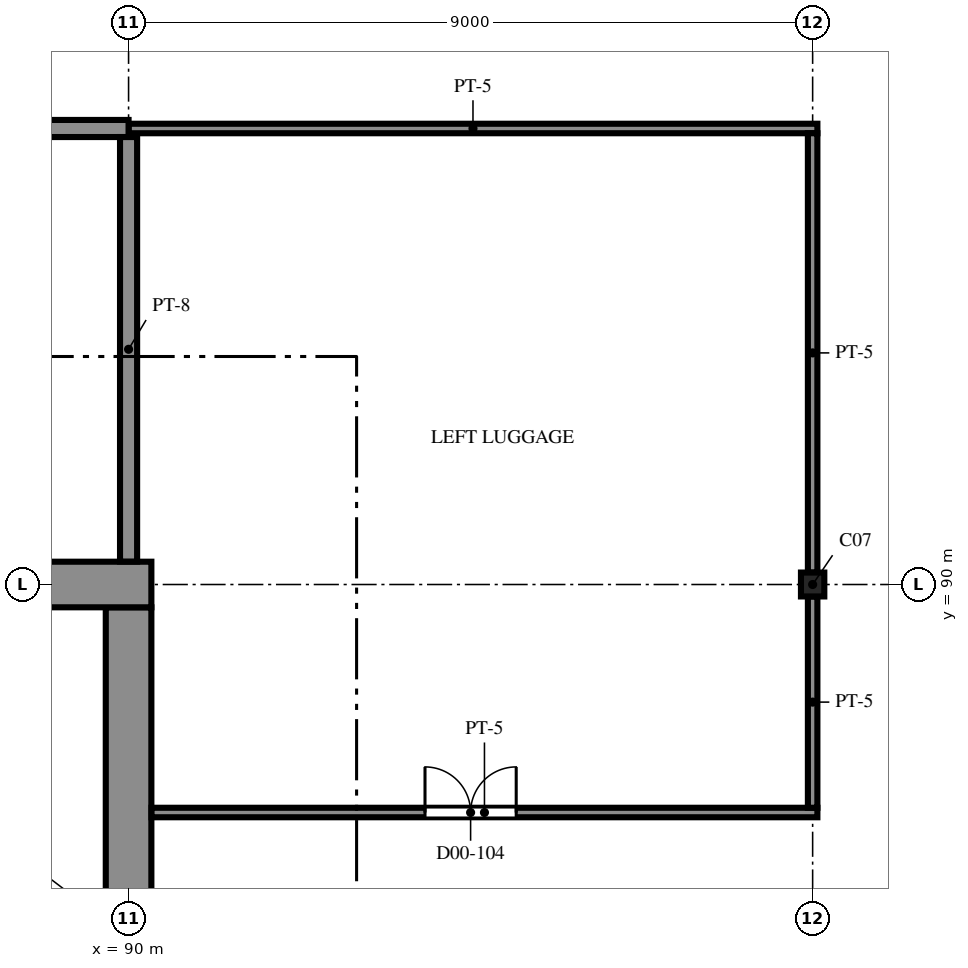
"""IFC4 building model, lengths in metres.
Left out: names, types, materials, properties, quantities, classifications, styles, units other than length and angle.
Written with IfcOpenShell. Run it as: python <this file> out.ifc"""

import sys

from ifc_helpers import new_model, si_unit, direction, frame, frame_2d, origin, origin_2d, place, context, subcontext, project, spatial, polyline, rectangle, i_section, outline, extrude, element, fill, save


model = new_model("IFC4")
c1 = context("Model", 3, precision=1e-05, world=origin(), true_north=direction((0.0, 1.0)))
c2 = subcontext(c1, "Body", "Model", "MODEL_VIEW")
j1 = project(units=[si_unit("LENGTHUNIT", "METRE"), si_unit("PLANEANGLEUNIT", "RADIAN")], contexts=[c1])
p1 = place(None, origin())
s1 = spatial("IfcSite", under=j1, at=p1, CompositionType="ELEMENT")
p2 = place(p1, origin())
s2 = spatial("IfcBuilding", under=s1, at=p2, CompositionType="ELEMENT")
p3 = place(p2, origin())
s3 = spatial("IfcBuildingStorey", under=s2, at=p3, CompositionType="ELEMENT", Elevation=0.0)
p4 = place(p3, frame((99.0, 90.0, -2.1), z_axis=(0.0, 0.0, 1.0), x_axis=(1.0, 0.0, 0.0)))
e1 = element("IfcColumn", 1, at=p4, inside=s3, PredefinedType="COLUMN", context=c2, shape_type="SweptSolid", body=[
    extrude(i_section(OverallWidth=0.307, OverallDepth=0.314, WebThickness=0.012, FlangeThickness=0.019, FilletRadius=0.015, at=origin_2d()), origin(), (0.0, 0.0, 1.0), 9.6),
])
p5 = place(p3, frame((71.7, 90.0, -2.1), z_axis=(0.0, 0.0, 1.0), x_axis=(1.0, 0.0, 0.0)))
e2 = element("IfcWall", 2, at=p5, inside=s3, PredefinedType="SOLIDWALL", context=c2, shape_type="SweptSolid", body=[
    extrude(rectangle(XDim=18.6, YDim=0.6, at=frame_2d((9.3, 0.0))), origin(), (0.0, 0.0, 1.0), 9.6),
])
p6 = place(p3, frame((90.0, 81.3, -2.1), z_axis=(0.0, 0.0, 1.0), x_axis=(0.0, 1.0, 0.0)))
e3 = element("IfcWall", 3, at=p6, inside=s3, PredefinedType="SOLIDWALL", context=c2, shape_type="SweptSolid", body=[
    extrude(rectangle(XDim=8.4, YDim=0.6, at=frame_2d((4.2, 0.0))), origin(), (0.0, 0.0, 1.0), 9.6),
])
p7 = place(p6, frame((2.8, 0.0, 2.1)))
e4 = element("IfcOpeningElement", 4, at=p7, cuts=e3, PredefinedType="OPENING", context=c2, shape_type="SweptSolid", body=[
    extrude(rectangle(XDim=1.8, YDim=2.1, at=frame_2d((0.9, 1.05))), frame((0.0, 0.31, 0.0), z_axis=(0.0, -1.0, 0.0), x_axis=(1.0, 0.0, 0.0)), (0.0, 0.0, 1.0), 0.62),
])
p8 = place(p6, frame((0.55, 0.0, 2.1)))
e5 = element("IfcOpeningElement", 5, at=p8, cuts=e3, PredefinedType="OPENING", context=c2, shape_type="SweptSolid", body=[
    extrude(rectangle(XDim=0.9, YDim=2.1, at=frame_2d((0.45, 1.05))), frame((0.0, 0.31, 0.0), z_axis=(0.0, -1.0, 0.0), x_axis=(1.0, 0.0, 0.0)), (0.0, 0.0, 1.0), 0.62),
])
p9 = place(p3, frame((99.062, 96.0, 0.0), z_axis=(0.0, 0.0, 1.0), x_axis=(-1.0, 0.0, 0.0)))
e6 = element("IfcWall", 6, at=p9, inside=s3, PredefinedType="PARTITIONING", context=c2, shape_type="SweptSolid", body=[
    extrude(rectangle(XDim=9.062, YDim=0.125, at=frame_2d((4.531, 0.0))), origin(), (0.0, 0.0, 1.0), 6.757),
])
p10 = place(p3, frame((90.0, 96.0, 0.0), z_axis=(0.0, 0.0, 1.0), x_axis=(-1.0, 0.0, 0.0)))
e7 = element("IfcWall", 7, at=p10, inside=s3, PredefinedType="PARTITIONING", context=c2, shape_type="SweptSolid", body=[
    extrude(rectangle(XDim=9.0, YDim=0.225, at=frame_2d((4.5, 0.0))), origin(), (0.0, 0.0, 1.0), 6.6),
])
p11 = place(p10, frame((3.9, 0.0, 0.0)))
e8 = element("IfcOpeningElement", 8, at=p11, cuts=e7, PredefinedType="OPENING", context=c2, shape_type="SweptSolid", body=[
    extrude(rectangle(XDim=1.2, YDim=2.4, at=frame_2d((0.6, 1.2))), frame((0.0, 0.123, 0.0), z_axis=(0.0, -1.0, 0.0), x_axis=(1.0, 0.0, 0.0)), (0.0, 0.0, 1.0), 0.245),
])
p12 = place(p3, frame((90.302, 87.0, 0.0), z_axis=(0.0, 0.0, 1.0), x_axis=(1.0, 0.0, 0.0)))
e9 = element("IfcWall", 9, at=p12, inside=s3, PredefinedType="PARTITIONING", context=c2, shape_type="SweptSolid", body=[
    extrude(rectangle(XDim=8.76, YDim=0.125, at=frame_2d((4.38, 0.0))), origin(), (0.0, 0.0, 1.0), 6.757),
])
p13 = place(p12, frame((3.598, 0.0, 0.0)))
e10 = element("IfcOpeningElement", 10, at=p13, cuts=e9, PredefinedType="OPENING", context=c2, shape_type="SweptSolid", body=[
    extrude(rectangle(XDim=1.2, YDim=2.1, at=frame_2d((0.6, 1.05))), frame((0.0, 0.073, 0.0), z_axis=(0.0, -1.0, 0.0), x_axis=(1.0, 0.0, 0.0)), (0.0, 0.0, 1.0), 0.145),
])
p14 = place(p3, frame((99.0, 87.062, 0.0), z_axis=(0.0, 0.0, 1.0), x_axis=(0.0, 1.0, 0.0)))
e11 = element("IfcWall", 11, at=p14, inside=s3, PredefinedType="PARTITIONING", context=c2, shape_type="SweptSolid", body=[
    extrude(rectangle(XDim=2.78, YDim=0.125, at=frame_2d((1.39, 0.0))), origin(), (0.0, 0.0, 1.0), 6.757),
])
p15 = place(p3, frame((99.0, 90.157, 0.0), z_axis=(0.0, 0.0, 1.0), x_axis=(0.0, 1.0, 0.0)))
e12 = element("IfcWall", 12, at=p15, inside=s3, PredefinedType="PARTITIONING", context=c2, shape_type="SweptSolid", body=[
    extrude(rectangle(XDim=5.78, YDim=0.125, at=frame_2d((2.89, 0.0))), origin(), (0.0, 0.0, 1.0), 6.757),
])
p16 = place(p3, frame((90.0, 95.887, 0.0), z_axis=(0.0, 0.0, 1.0), x_axis=(0.0, -1.0, 0.0)))
e13 = element("IfcWall", 13, at=p16, inside=s3, PredefinedType="PARTITIONING", context=c2, shape_type="SweptSolid", body=[
    extrude(rectangle(XDim=5.585, YDim=0.225, at=frame_2d((2.793, 0.0))), origin(), (0.0, 0.0, 1.0), 6.6),
])
p17 = place(p13, origin())
e14 = element("IfcDoor", 14, at=p17, inside=s3, OperationType="DOUBLE_DOOR_SINGLE_SWING", PredefinedType="DOOR", context=c2, shape_type="SweptSolid", body=[
    extrude(outline(polyline([(0.0, 0.0), (0.07, 0.0), (0.07, 2.03), (1.13, 2.03), (1.13, 0.0), (1.2, 0.0), (1.2, 2.1), (0.0, 2.1), (0.0, 0.0)])), frame((0.0, 0.025, 0.0), z_axis=(0.0, -1.0, 0.0), x_axis=(1.0, 0.0, 0.0)), (0.0, 0.0, 1.0), 0.05),
    extrude(outline(polyline([(0.074, 0.01), (0.597, 0.01), (0.597, 2.026), (0.074, 2.026), (0.074, 0.01)]), holes=[polyline([(0.178, 0.373), (0.492, 0.373), (0.492, 1.784), (0.178, 1.784), (0.178, 0.373)])]), frame((0.0, 0.017, 0.0), z_axis=(0.0, -1.0, 0.0), x_axis=(1.0, 0.0, 0.0)), (0.0, 0.0, 1.0), 0.035),
    extrude(rectangle(XDim=0.314, YDim=1.411, at=frame_2d((0.335, 1.079))), frame((0.0, 0.009, 0.0), z_axis=(0.0, -1.0, 0.0), x_axis=(1.0, 0.0, 0.0)), (0.0, 0.0, 1.0), 0.017),
    extrude(outline(polyline([(0.603, 0.01), (1.126, 0.01), (1.126, 2.026), (0.603, 2.026), (0.603, 0.01)]), holes=[polyline([(0.708, 0.373), (1.021, 0.373), (1.021, 1.784), (0.708, 1.784), (0.708, 0.373)])]), frame((0.0, 0.017, 0.0), z_axis=(0.0, -1.0, 0.0), x_axis=(1.0, 0.0, 0.0)), (0.0, 0.0, 1.0), 0.035),
    extrude(rectangle(XDim=0.314, YDim=1.411, at=frame_2d((0.865, 1.079))), frame((0.0, 0.009, 0.0), z_axis=(0.0, -1.0, 0.0), x_axis=(1.0, 0.0, 0.0)), (0.0, 0.0, 1.0), 0.017),
])
fill(e10, e14)
save(model, sys.argv[1])
